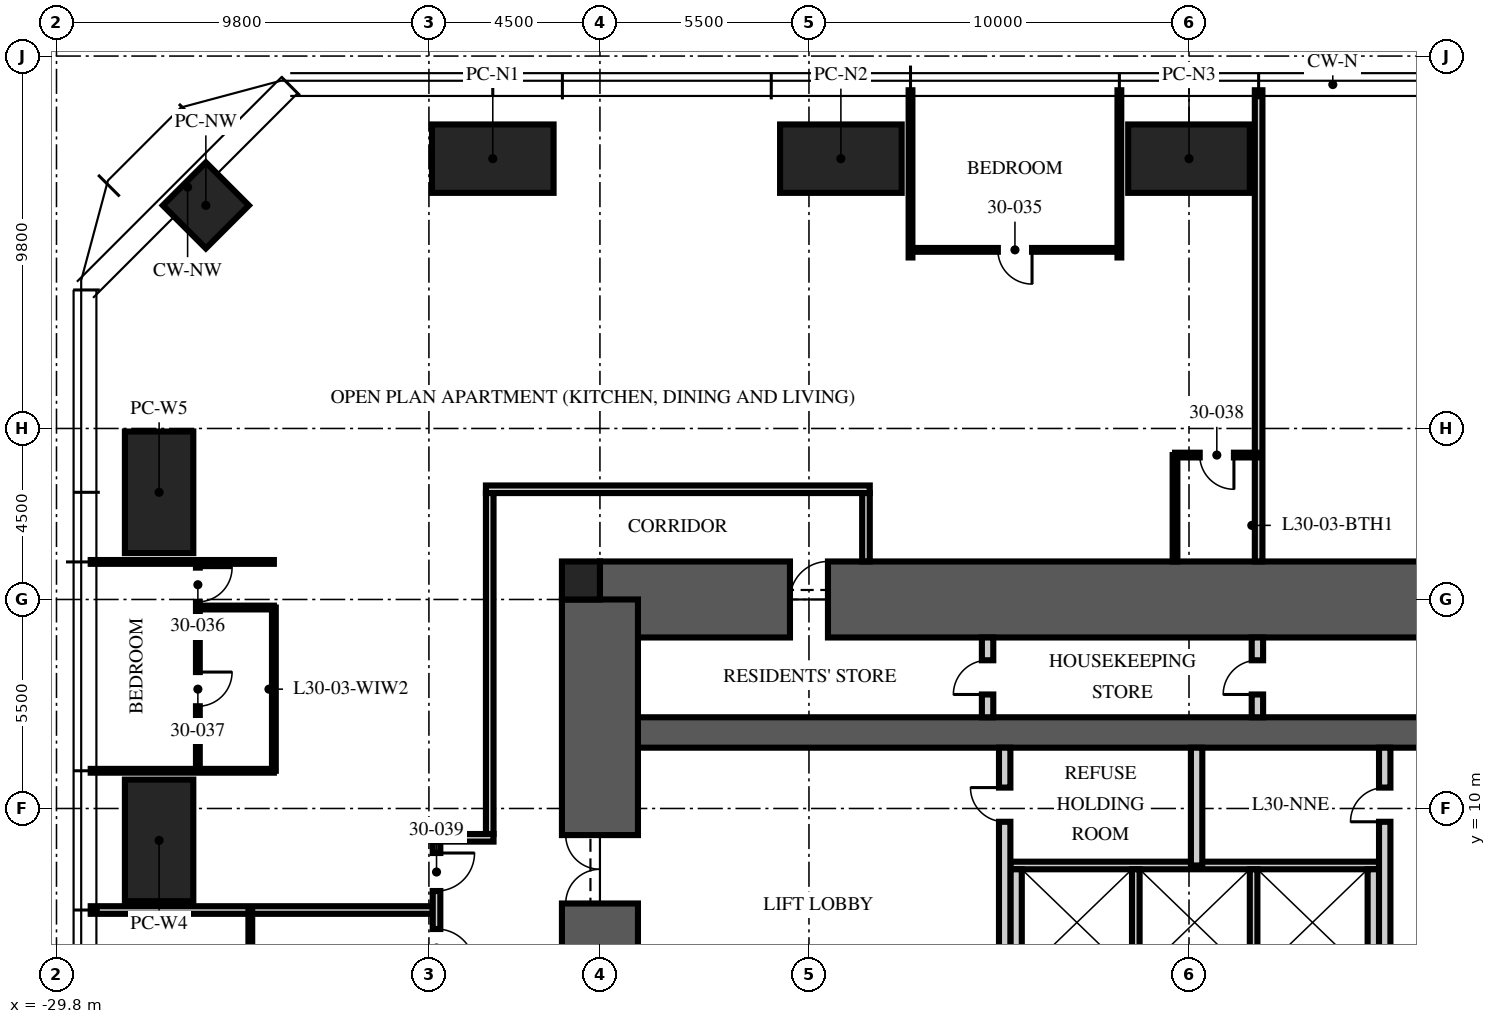
"""IFC4 building model, lengths in metres.
Left out: names, types, materials, properties, quantities, classifications, styles, units other than length and angle.
Written with IfcOpenShell. Run it as: python <this file> out.ifc"""

import sys

from ifc_helpers import new_model, si_unit, direction, frame, frame_2d, origin, origin_2d, place, context, subcontext, project, spatial, rectangle, extrude, element, fill, save


model = new_model("IFC4")
c1 = context("Model", 3, precision=1e-05, world=origin(), true_north=direction((0.0, 1.0)))
c2 = subcontext(c1, "Body", "Model", "MODEL_VIEW")
j1 = project(units=[si_unit("LENGTHUNIT", "METRE"), si_unit("PLANEANGLEUNIT", "RADIAN")], contexts=[c1])
p1 = place(None, origin())
s1 = spatial("IfcSite", under=j1, at=p1, CompositionType="ELEMENT")
p2 = place(p1, origin())
s2 = spatial("IfcBuilding", under=s1, at=p2, CompositionType="ELEMENT")
p3 = place(p2, frame((0.0, 0.0, 122.25)))
s3 = spatial("IfcBuildingStorey", under=s2, at=p3, CompositionType="ELEMENT", Elevation=122.25)
p4 = place(p3, frame((-15.5, 15.5, -0.25), z_axis=(0.0, 0.0, 1.0), x_axis=(1.0, 0.0, 0.0)))
e1 = element("IfcWall", 1, at=p4, inside=s3, PredefinedType="SHEAR", context=c2, shape_type="SweptSolid", body=[
    extrude(rectangle(XDim=31.0, YDim=2.0, at=frame_2d((15.5, 0.0))), origin(), (0.0, 0.0, 1.0), 3.75),
])
p5 = place(p4, frame((5.0, 0.0, 0.25)))
e2 = element("IfcOpeningElement", 2, at=p5, cuts=e1, PredefinedType="OPENING", context=c2, shape_type="SweptSolid", body=[
    extrude(rectangle(XDim=1.0, YDim=2.1, at=frame_2d((0.5, 1.05))), frame((0.0, 1.01, 0.0), z_axis=(0.0, -1.0, 0.0), x_axis=(1.0, 0.0, 0.0)), (0.0, 0.0, 1.0), 2.02),
])
p6 = place(p3, frame((-15.5, 12.0, -0.25), z_axis=(0.0, 0.0, 1.0), x_axis=(1.0, 0.0, 0.0)))
e3 = element("IfcWall", 3, at=p6, inside=s3, PredefinedType="SHEAR", context=c2, shape_type="SweptSolid", body=[
    extrude(rectangle(XDim=31.0, YDim=0.8, at=frame_2d((15.5, 0.0))), origin(), (0.0, 0.0, 1.0), 3.75),
])
p7 = place(p3, frame((-15.5, -15.5, -0.25), z_axis=(0.0, 0.0, 1.0), x_axis=(0.0, 1.0, 0.0)))
e4 = element("IfcWall", 4, at=p7, inside=s3, PredefinedType="SHEAR", context=c2, shape_type="SweptSolid", body=[
    extrude(rectangle(XDim=31.0, YDim=2.0, at=frame_2d((15.5, 0.0))), origin(), (0.0, 0.0, 1.0), 3.75),
])
p8 = place(p7, frame((6.5, 0.0, 0.25)))
e5 = element("IfcOpeningElement", 5, at=p8, cuts=e4, PredefinedType="OPENING", context=c2, shape_type="SweptSolid", body=[
    extrude(rectangle(XDim=1.2, YDim=2.1, at=frame_2d((0.6, 1.05))), frame((0.0, 1.01, 0.0), z_axis=(0.0, -1.0, 0.0), x_axis=(1.0, 0.0, 0.0)), (0.0, 0.0, 1.0), 2.02),
])
p9 = place(p7, frame((23.0, 0.0, 0.25)))
e6 = element("IfcOpeningElement", 6, at=p9, cuts=e4, PredefinedType="OPENING", context=c2, shape_type="SweptSolid", body=[
    extrude(rectangle(XDim=1.8, YDim=2.1, at=frame_2d((0.9, 1.05))), frame((0.0, 1.01, 0.0), z_axis=(0.0, -1.0, 0.0), x_axis=(1.0, 0.0, 0.0)), (0.0, 0.0, 1.0), 2.02),
])
p10 = place(p3, frame((-16.0, 16.0, -0.25), z_axis=(0.0, 0.0, 1.0), x_axis=(1.0, 0.0, 0.0)))
e7 = element("IfcColumn", 7, at=p10, inside=s3, PredefinedType="COLUMN", context=c2, shape_type="SweptSolid", body=[
    extrude(rectangle(XDim=1.0, YDim=1.0, at=origin_2d()), origin(), (0.0, 0.0, 1.0), 3.75),
])
for number, where, z_axis, x_axis in (
    (8, (-18.32, 27.1, 0.0), (0.0, 0.0, 1.0), (1.0, 0.0, 0.0)),
    (9, (-9.16, 27.1, 0.0), (0.0, 0.0, 1.0), (1.0, 0.0, 0.0)),
    (10, (0.0, 27.1, 0.0), (0.0, 0.0, 1.0), (1.0, 0.0, 0.0)),
    (11, (-27.1, 9.16, 0.0), (0.0, 0.0, 1.0), (0.0, 1.0, 0.0)),
    (12, (-27.1, 18.32, 0.0), (0.0, 0.0, 1.0), (0.0, 1.0, 0.0)),
):
    element("IfcColumn", number, at=place(p3, frame(where, z_axis=z_axis, x_axis=x_axis)), inside=s3, PredefinedType="COLUMN", context=c2, shape_type="SweptSolid", body=[
        extrude(rectangle(XDim=3.2, YDim=1.8, at=origin_2d()), origin(), (0.0, 0.0, 1.0), 3.75),
    ])
p11 = place(p3, frame((-25.87, 25.87, 0.0), z_axis=(0.0, 0.0, 1.0), x_axis=(0.707106781187, 0.707106781187, 0.0)))
e13 = element("IfcColumn", 13, at=p11, inside=s3, PredefinedType="COLUMN", context=c2, shape_type="SweptSolid", body=[
    extrude(rectangle(XDim=1.6, YDim=1.6, at=origin_2d()), origin(), (0.0, 0.0, 1.0), 3.75),
])
p12 = place(p3, frame((-4.7, 8.5, 0.0), z_axis=(0.0, 0.0, 1.0), x_axis=(1.0, 0.0, 0.0)))
e14 = element("IfcWall", 14, at=p12, inside=s3, PredefinedType="PARTITIONING", context=c2, shape_type="SweptSolid", body=[
    extrude(rectangle(XDim=9.7, YDim=0.2, at=frame_2d((4.85, 0.0))), origin(), (0.0, 0.0, 1.0), 3.5),
])
for number, where, z_axis, x_axis in (
    (15, (-4.55, 5.6, 0.0), (0.0, 0.0, 1.0), (0.0, 1.0, 0.0)),
    (16, (4.85, 5.6, 0.0), (0.0, 0.0, 1.0), (0.0, 1.0, 0.0)),
):
    element("IfcWall", number, at=place(p3, frame(where, z_axis=z_axis, x_axis=x_axis)), inside=s3, PredefinedType="PARTITIONING", context=c2, shape_type="SweptSolid", body=[
        extrude(rectangle(XDim=2.8, YDim=0.3, at=frame_2d((1.4, 0.0))), origin(), (0.0, 0.0, 1.0), 3.5),
    ])
for number, where, z_axis, x_axis in (
    (17, (-1.4, 5.6, 0.0), (0.0, 0.0, 1.0), (0.0, 1.0, 0.0)),
    (18, (1.7, 5.6, 0.0), (0.0, 0.0, 1.0), (0.0, 1.0, 0.0)),
):
    element("IfcWall", number, at=place(p3, frame(where, z_axis=z_axis, x_axis=x_axis)), inside=s3, PredefinedType="PARTITIONING", context=c2, shape_type="SweptSolid", body=[
        extrude(rectangle(XDim=2.8, YDim=0.2, at=frame_2d((1.4, 0.0))), origin(), (0.0, 0.0, 1.0), 3.5),
    ])
p13 = place(p3, frame((-4.85, 5.3, 0.0), z_axis=(0.0, 0.0, 1.0), x_axis=(0.0, 1.0, 0.0)))
e19 = element("IfcWall", 19, at=p13, inside=s3, PredefinedType="PARTITIONING", context=c2, shape_type="SweptSolid", body=[
    extrude(rectangle(XDim=6.3, YDim=0.3, at=frame_2d((3.15, 0.0))), origin(), (0.0, 0.0, 1.0), 3.5),
])
p14 = place(p13, frame((4.35, 0.0, 0.0)))
e20 = element("IfcOpeningElement", 20, at=p14, cuts=e19, PredefinedType="OPENING", context=c2, shape_type="SweptSolid", body=[
    extrude(rectangle(XDim=0.9, YDim=2.1, at=frame_2d((0.45, 1.05))), frame((0.0, 0.16, 0.0), z_axis=(0.0, -1.0, 0.0), x_axis=(1.0, 0.0, 0.0)), (0.0, 0.0, 1.0), 0.32),
])
p15 = place(p3, frame((5.15, 5.3, 0.0), z_axis=(0.0, 0.0, 1.0), x_axis=(0.0, 1.0, 0.0)))
e21 = element("IfcWall", 21, at=p15, inside=s3, PredefinedType="PARTITIONING", context=c2, shape_type="SweptSolid", body=[
    extrude(rectangle(XDim=6.3, YDim=0.3, at=frame_2d((3.15, 0.0))), origin(), (0.0, 0.0, 1.0), 3.5),
])
p16 = place(p15, frame((4.35, 0.0, 0.0)))
e22 = element("IfcOpeningElement", 22, at=p16, cuts=e21, PredefinedType="OPENING", context=c2, shape_type="SweptSolid", body=[
    extrude(rectangle(XDim=0.9, YDim=2.1, at=frame_2d((0.45, 1.05))), frame((0.0, 0.16, 0.0), z_axis=(0.0, -1.0, 0.0), x_axis=(1.0, 0.0, 0.0)), (0.0, 0.0, 1.0), 0.32),
])
p17 = place(p3, frame((0.2, 8.5, 0.0), z_axis=(0.0, 0.0, 1.0), x_axis=(0.0, 1.0, 0.0)))
e23 = element("IfcWall", 23, at=p17, inside=s3, PredefinedType="PARTITIONING", context=c2, shape_type="SweptSolid", body=[
    extrude(rectangle(XDim=3.1, YDim=0.3, at=frame_2d((1.55, 0.0))), origin(), (0.0, 0.0, 1.0), 3.5),
])
p18 = place(p3, frame((-5.3, 12.4, 0.0), z_axis=(0.0, 0.0, 1.0), x_axis=(0.0, 1.0, 0.0)))
e24 = element("IfcWall", 24, at=p18, inside=s3, PredefinedType="PARTITIONING", context=c2, shape_type="SweptSolid", body=[
    extrude(rectangle(XDim=2.1, YDim=0.3, at=frame_2d((1.05, 0.0))), origin(), (0.0, 0.0, 1.0), 3.5),
])
p19 = place(p18, frame((0.6, 0.0, 0.0)))
e25 = element("IfcOpeningElement", 25, at=p19, cuts=e24, PredefinedType="OPENING", context=c2, shape_type="SweptSolid", body=[
    extrude(rectangle(XDim=0.9, YDim=2.1, at=frame_2d((0.45, 1.05))), frame((0.0, 0.16, 0.0), z_axis=(0.0, -1.0, 0.0), x_axis=(1.0, 0.0, 0.0)), (0.0, 0.0, 1.0), 0.32),
])
p20 = place(p3, frame((1.8, 12.4, 0.0), z_axis=(0.0, 0.0, 1.0), x_axis=(0.0, 1.0, 0.0)))
e26 = element("IfcWall", 26, at=p20, inside=s3, PredefinedType="PARTITIONING", context=c2, shape_type="SweptSolid", body=[
    extrude(rectangle(XDim=2.1, YDim=0.3, at=frame_2d((1.05, 0.0))), origin(), (0.0, 0.0, 1.0), 3.5),
])
p21 = place(p20, frame((0.6, 0.0, 0.0)))
e27 = element("IfcOpeningElement", 27, at=p21, cuts=e26, PredefinedType="OPENING", context=c2, shape_type="SweptSolid", body=[
    extrude(rectangle(XDim=0.9, YDim=2.1, at=frame_2d((0.45, 1.05))), frame((0.0, 0.16, 0.0), z_axis=(0.0, -1.0, 0.0), x_axis=(1.0, 0.0, 0.0)), (0.0, 0.0, 1.0), 0.32),
])
p22 = place(p3, frame((-18.5, 18.4, 0.0), z_axis=(0.0, 0.0, 1.0), x_axis=(1.0, 0.0, 0.0)))
e28 = element("IfcWall", 28, at=p22, inside=s3, PredefinedType="PARTITIONING", context=c2, shape_type="SweptSolid", body=[
    extrude(rectangle(XDim=10.1, YDim=0.2, at=frame_2d((5.05, 0.0))), origin(), (0.0, 0.0, 1.0), 2.3),
])
p23 = place(p3, frame((-8.5, 18.3, 0.0), z_axis=(0.0, 0.0, 1.0), x_axis=(0.0, -1.0, 0.0)))
e29 = element("IfcWall", 29, at=p23, inside=s3, PredefinedType="PARTITIONING", context=c2, shape_type="SweptSolid", body=[
    extrude(rectangle(XDim=1.8, YDim=0.2, at=frame_2d((0.9, 0.0))), origin(), (0.0, 0.0, 1.0), 3.5),
])
p24 = place(p3, frame((1.832, 16.5, 0.0), z_axis=(0.0, 0.0, 1.0), x_axis=(0.0, 1.0, 0.0)))
e30 = element("IfcWall", 30, at=p24, inside=s3, PredefinedType="PARTITIONING", context=c2, shape_type="SweptSolid", body=[
    extrude(rectangle(XDim=12.4, YDim=0.2, at=frame_2d((6.2, 0.0))), origin(), (0.0, 0.0, 1.0), 2.81),
])
for number, where, z_axis, x_axis in (
    (31, (-1.832, 24.5, 0.0), (0.0, 0.0, 1.0), (0.0, 1.0, 0.0)),
    (32, (-7.328, 24.5, 0.0), (0.0, 0.0, 1.0), (0.0, 1.0, 0.0)),
):
    element("IfcWall", number, at=place(p3, frame(where, z_axis=z_axis, x_axis=x_axis)), inside=s3, PredefinedType="PARTITIONING", context=c2, shape_type="SweptSolid", body=[
        extrude(rectangle(XDim=4.4, YDim=0.1, at=frame_2d((2.2, 0.0))), origin(), (0.0, 0.0, 1.0), 2.81),
    ])
for number, where, z_axis, x_axis in (
    (33, (-24.08, 16.488, 0.0), (0.0, 0.0, 1.0), (-1.0, 0.0, 0.0)),
    (34, (-24.08, 10.992, 0.0), (0.0, 0.0, 1.0), (-1.0, 0.0, 0.0)),
):
    element("IfcWall", number, at=place(p3, frame(where, z_axis=z_axis, x_axis=x_axis)), inside=s3, PredefinedType="PARTITIONING", context=c2, shape_type="SweptSolid", body=[
        extrude(rectangle(XDim=4.82, YDim=0.1, at=frame_2d((2.41, 0.0))), origin(), (0.0, 0.0, 1.0), 2.81),
    ])
p25 = place(p3, frame((-19.9, 7.328, 0.0), z_axis=(0.0, 0.0, 1.0), x_axis=(-1.0, 0.0, 0.0)))
e35 = element("IfcWall", 35, at=p25, inside=s3, PredefinedType="PARTITIONING", context=c2, shape_type="SweptSolid", body=[
    extrude(rectangle(XDim=9.0, YDim=0.2, at=frame_2d((4.5, 0.0))), origin(), (0.0, 0.0, 1.0), 2.81),
])
p26 = place(p3, frame((-1.832, 24.7, 0.0), z_axis=(0.0, 0.0, 1.0), x_axis=(-1.0, 0.0, 0.0)))
e36 = element("IfcWall", 36, at=p26, inside=s3, PredefinedType="PARTITIONING", context=c2, shape_type="SweptSolid", body=[
    extrude(rectangle(XDim=5.496, YDim=0.1, at=frame_2d((2.748, 0.0))), origin(), (0.0, 0.0, 1.0), 2.81),
])
p27 = place(p26, frame((2.298, 0.0, 0.0)))
e37 = element("IfcOpeningElement", 37, at=p27, cuts=e36, PredefinedType="OPENING", context=c2, shape_type="SweptSolid", body=[
    extrude(rectangle(XDim=0.9, YDim=2.1, at=frame_2d((0.45, 1.05))), frame((0.0, 0.06, 0.0), z_axis=(0.0, -1.0, 0.0), x_axis=(1.0, 0.0, 0.0)), (0.0, 0.0, 1.0), 0.12),
])
p28 = place(p3, frame((-26.08, 16.488, 0.0), z_axis=(0.0, 0.0, 1.0), x_axis=(0.0, -1.0, 0.0)))
e38 = element("IfcWall", 38, at=p28, inside=s3, PredefinedType="PARTITIONING", context=c2, shape_type="SweptSolid", body=[
    extrude(rectangle(XDim=5.496, YDim=0.1, at=frame_2d((2.748, 0.0))), origin(), (0.0, 0.0, 1.0), 2.81),
])
p29 = place(p28, frame((0.15, 0.0, 0.0)))
e39 = element("IfcOpeningElement", 39, at=p29, cuts=e38, PredefinedType="OPENING", context=c2, shape_type="SweptSolid", body=[
    extrude(rectangle(XDim=0.9, YDim=2.1, at=frame_2d((0.45, 1.05))), frame((0.0, 0.06, 0.0), z_axis=(0.0, -1.0, 0.0), x_axis=(1.0, 0.0, 0.0)), (0.0, 0.0, 1.0), 0.12),
])
p30 = place(p28, frame((2.898, 0.0, 0.0)))
e40 = element("IfcOpeningElement", 40, at=p30, cuts=e38, PredefinedType="OPENING", context=c2, shape_type="SweptSolid", body=[
    extrude(rectangle(XDim=0.9, YDim=2.1, at=frame_2d((0.45, 1.05))), frame((0.0, 0.06, 0.0), z_axis=(0.0, -1.0, 0.0), x_axis=(1.0, 0.0, 0.0)), (0.0, 0.0, 1.0), 0.12),
])
p31 = place(p3, frame((-24.08, 15.288, 0.0), z_axis=(0.0, 0.0, 1.0), x_axis=(-1.0, 0.0, 0.0)))
e41 = element("IfcWall", 41, at=p31, inside=s3, PredefinedType="PARTITIONING", context=c2, shape_type="SweptSolid", body=[
    extrude(rectangle(XDim=2.0, YDim=0.1, at=frame_2d((1.0, 0.0))), origin(), (0.0, 0.0, 1.0), 3.5),
])
p32 = place(p3, frame((-24.08, 15.288, 0.0), z_axis=(0.0, 0.0, 1.0), x_axis=(0.0, -1.0, 0.0)))
e42 = element("IfcWall", 42, at=p32, inside=s3, PredefinedType="PARTITIONING", context=c2, shape_type="SweptSolid", body=[
    extrude(rectangle(XDim=4.296, YDim=0.1, at=frame_2d((2.148, 0.0))), origin(), (0.0, 0.0, 1.0), 2.81),
])
p33 = place(p3, frame((1.832, 19.3, 0.0), z_axis=(0.0, 0.0, 1.0), x_axis=(-1.0, 0.0, 0.0)))
e43 = element("IfcWall", 43, at=p33, inside=s3, PredefinedType="PARTITIONING", context=c2, shape_type="SweptSolid", body=[
    extrude(rectangle(XDim=2.2, YDim=0.125, at=frame_2d((1.1, 0.0))), origin(), (0.0, 0.0, 1.0), 2.7),
])
p34 = place(p33, frame((0.65, 0.0, 0.0)))
e44 = element("IfcOpeningElement", 44, at=p34, cuts=e43, PredefinedType="OPENING", context=c2, shape_type="SweptSolid", body=[
    extrude(rectangle(XDim=0.9, YDim=2.1, at=frame_2d((0.45, 1.05))), frame((0.0, 0.073, 0.0), z_axis=(0.0, -1.0, 0.0), x_axis=(1.0, 0.0, 0.0)), (0.0, 0.0, 1.0), 0.145),
])
p35 = place(p3, frame((-0.368, 16.5, 0.0), z_axis=(0.0, 0.0, 1.0), x_axis=(0.0, 1.0, 0.0)))
e45 = element("IfcWall", 45, at=p35, inside=s3, PredefinedType="PARTITIONING", context=c2, shape_type="SweptSolid", body=[
    extrude(rectangle(XDim=2.8, YDim=0.125, at=frame_2d((1.4, 0.0))), origin(), (0.0, 0.0, 1.0), 3.5),
])
p36 = place(p3, frame((-24.7, 7.328, 0.0), z_axis=(0.0, 0.0, 1.0), x_axis=(0.0, -1.0, 0.0)))
e46 = element("IfcWall", 46, at=p36, inside=s3, PredefinedType="PARTITIONING", context=c2, shape_type="SweptSolid", body=[
    extrude(rectangle(XDim=5.496, YDim=0.1, at=frame_2d((2.748, 0.0))), origin(), (0.0, 0.0, 1.0), 2.81),
])
p37 = place(p36, frame((2.298, 0.0, 0.0)))
e47 = element("IfcOpeningElement", 47, at=p37, cuts=e46, PredefinedType="OPENING", context=c2, shape_type="SweptSolid", body=[
    extrude(rectangle(XDim=0.9, YDim=2.1, at=frame_2d((0.45, 1.05))), frame((0.0, 0.06, 0.0), z_axis=(0.0, -1.0, 0.0), x_axis=(1.0, 0.0, 0.0)), (0.0, 0.0, 1.0), 0.12),
])
p38 = place(p3, frame((-18.4, 18.3, 0.0), z_axis=(0.0, 0.0, 1.0), x_axis=(0.0, -1.0, 0.0)))
e48 = element("IfcWall", 48, at=p38, inside=s3, PredefinedType="PARTITIONING", context=c2, shape_type="SweptSolid", body=[
    extrude(rectangle(XDim=8.972, YDim=0.2, at=frame_2d((4.486, 0.0))), origin(), (0.0, 0.0, 1.0), 2.3),
])
p39 = place(p3, frame((-18.3, 9.228, 0.0), z_axis=(0.0, 0.0, 1.0), x_axis=(-1.0, 0.0, 0.0)))
e49 = element("IfcWall", 49, at=p39, inside=s3, PredefinedType="PARTITIONING", context=c2, shape_type="SweptSolid", body=[
    extrude(rectangle(XDim=1.6, YDim=0.2, at=frame_2d((0.8, 0.0))), origin(), (0.0, 0.0, 1.0), 2.7),
])
p40 = place(p3, frame((-19.8, 9.128, 0.0), z_axis=(0.0, 0.0, 1.0), x_axis=(0.0, -1.0, 0.0)))
e50 = element("IfcWall", 50, at=p40, inside=s3, PredefinedType="PARTITIONING", context=c2, shape_type="SweptSolid", body=[
    extrude(rectangle(XDim=3.6, YDim=0.2, at=frame_2d((1.8, 0.0))), origin(), (0.0, 0.0, 1.0), 2.7),
])
p41 = place(p40, frame((0.3, 0.0, 0.0)))
e51 = element("IfcOpeningElement", 51, at=p41, cuts=e50, PredefinedType="OPENING", context=c2, shape_type="SweptSolid", body=[
    extrude(rectangle(XDim=1.0, YDim=2.2, at=frame_2d((0.5, 1.1))), frame((0.0, 0.11, 0.0), z_axis=(0.0, -1.0, 0.0), x_axis=(1.0, 0.0, 0.0)), (0.0, 0.0, 1.0), 0.22),
])
p42 = place(p40, frame((2.3, 0.0, 0.0)))
e52 = element("IfcOpeningElement", 52, at=p42, cuts=e50, PredefinedType="OPENING", context=c2, shape_type="SweptSolid", body=[
    extrude(rectangle(XDim=1.0, YDim=2.2, at=frame_2d((0.5, 1.1))), frame((0.0, 0.11, 0.0), z_axis=(0.0, -1.0, 0.0), x_axis=(1.0, 0.0, 0.0)), (0.0, 0.0, 1.0), 0.22),
])
p43 = place(p9, origin())
e53 = element("IfcDoor", 53, at=p43, inside=s3, OperationType="DOUBLE_DOOR_SINGLE_SWING", PredefinedType="DOOR", context=c2, shape_type="SweptSolid", body=[
    extrude(rectangle(XDim=1.8, YDim=2.1, at=frame_2d((0.9, 1.05))), frame((0.0, 0.025, 0.0), z_axis=(0.0, -1.0, 0.0), x_axis=(1.0, 0.0, 0.0)), (0.0, 0.0, 1.0), 0.05),
])
fill(e6, e53)
p44 = place(p14, origin())
e54 = element("IfcDoor", 54, at=p44, inside=s3, OperationType="SINGLE_SWING_RIGHT", PredefinedType="DOOR", context=c2, shape_type="SweptSolid", body=[
    extrude(rectangle(XDim=0.9, YDim=2.1, at=frame_2d((0.45, 1.05))), frame((0.0, 0.025, 0.0), z_axis=(0.0, -1.0, 0.0), x_axis=(1.0, 0.0, 0.0)), (0.0, 0.0, 1.0), 0.05),
])
fill(e20, e54)
p45 = place(p16, origin())
e55 = element("IfcDoor", 55, at=p45, inside=s3, OperationType="SINGLE_SWING_LEFT", PredefinedType="DOOR", context=c2, shape_type="SweptSolid", body=[
    extrude(rectangle(XDim=0.9, YDim=2.1, at=frame_2d((0.45, 1.05))), frame((0.0, 0.025, 0.0), z_axis=(0.0, -1.0, 0.0), x_axis=(1.0, 0.0, 0.0)), (0.0, 0.0, 1.0), 0.05),
])
fill(e22, e55)
p46 = place(p19, origin())
e56 = element("IfcDoor", 56, at=p46, inside=s3, OperationType="SINGLE_SWING_LEFT", PredefinedType="DOOR", context=c2, shape_type="SweptSolid", body=[
    extrude(rectangle(XDim=0.9, YDim=2.1, at=frame_2d((0.45, 1.05))), frame((0.0, 0.025, 0.0), z_axis=(0.0, -1.0, 0.0), x_axis=(1.0, 0.0, 0.0)), (0.0, 0.0, 1.0), 0.05),
])
fill(e25, e56)
p47 = place(p21, origin())
e57 = element("IfcDoor", 57, at=p47, inside=s3, OperationType="SINGLE_SWING_LEFT", PredefinedType="DOOR", context=c2, shape_type="SweptSolid", body=[
    extrude(rectangle(XDim=0.9, YDim=2.1, at=frame_2d((0.45, 1.05))), frame((0.0, 0.025, 0.0), z_axis=(0.0, -1.0, 0.0), x_axis=(1.0, 0.0, 0.0)), (0.0, 0.0, 1.0), 0.05),
])
fill(e27, e57)
p48 = place(p5, origin())
e58 = element("IfcDoor", 58, at=p48, inside=s3, OperationType="SINGLE_SWING_RIGHT", PredefinedType="DOOR", context=c2, shape_type="SweptSolid", body=[
    extrude(rectangle(XDim=1.0, YDim=2.1, at=frame_2d((0.5, 1.05))), frame((0.0, 0.025, 0.0), z_axis=(0.0, -1.0, 0.0), x_axis=(1.0, 0.0, 0.0)), (0.0, 0.0, 1.0), 0.05),
])
fill(e2, e58)
p49 = place(p27, origin())
e59 = element("IfcDoor", 59, at=p49, inside=s3, OperationType="SINGLE_SWING_LEFT", PredefinedType="DOOR", context=c2, shape_type="SweptSolid", body=[
    extrude(rectangle(XDim=0.9, YDim=2.1, at=frame_2d((0.45, 1.05))), frame((0.0, 0.025, 0.0), z_axis=(0.0, -1.0, 0.0), x_axis=(1.0, 0.0, 0.0)), (0.0, 0.0, 1.0), 0.05),
])
fill(e37, e59)
p50 = place(p29, origin())
e60 = element("IfcDoor", 60, at=p50, inside=s3, OperationType="SINGLE_SWING_LEFT", PredefinedType="DOOR", context=c2, shape_type="SweptSolid", body=[
    extrude(rectangle(XDim=0.9, YDim=2.1, at=frame_2d((0.45, 1.05))), frame((0.0, 0.025, 0.0), z_axis=(0.0, -1.0, 0.0), x_axis=(1.0, 0.0, 0.0)), (0.0, 0.0, 1.0), 0.05),
])
fill(e39, e60)
p51 = place(p30, origin())
e61 = element("IfcDoor", 61, at=p51, inside=s3, OperationType="SINGLE_SWING_LEFT", PredefinedType="DOOR", context=c2, shape_type="SweptSolid", body=[
    extrude(rectangle(XDim=0.9, YDim=2.1, at=frame_2d((0.45, 1.05))), frame((0.0, 0.025, 0.0), z_axis=(0.0, -1.0, 0.0), x_axis=(1.0, 0.0, 0.0)), (0.0, 0.0, 1.0), 0.05),
])
fill(e40, e61)
p52 = place(p34, origin())
e62 = element("IfcDoor", 62, at=p52, inside=s3, OperationType="SINGLE_SWING_LEFT", PredefinedType="DOOR", context=c2, shape_type="SweptSolid", body=[
    extrude(rectangle(XDim=0.9, YDim=2.1, at=frame_2d((0.45, 1.05))), frame((0.0, 0.025, 0.0), z_axis=(0.0, -1.0, 0.0), x_axis=(1.0, 0.0, 0.0)), (0.0, 0.0, 1.0), 0.05),
])
fill(e44, e62)
p53 = place(p41, origin())
e63 = element("IfcDoor", 63, at=p53, inside=s3, OperationType="SINGLE_SWING_LEFT", PredefinedType="DOOR", context=c2, shape_type="SweptSolid", body=[
    extrude(rectangle(XDim=1.0, YDim=2.2, at=frame_2d((0.5, 1.1))), frame((0.0, 0.025, 0.0), z_axis=(0.0, -1.0, 0.0), x_axis=(1.0, 0.0, 0.0)), (0.0, 0.0, 1.0), 0.05),
])
fill(e51, e63)
p54 = place(p42, origin())
e64 = element("IfcDoor", 64, at=p54, inside=s3, OperationType="SINGLE_SWING_RIGHT", PredefinedType="DOOR", context=c2, shape_type="SweptSolid", body=[
    extrude(rectangle(XDim=1.0, YDim=2.2, at=frame_2d((0.5, 1.1))), frame((0.0, 0.025, 0.0), z_axis=(0.0, -1.0, 0.0), x_axis=(1.0, 0.0, 0.0)), (0.0, 0.0, 1.0), 0.05),
])
fill(e52, e64)
save(model, sys.argv[1])
